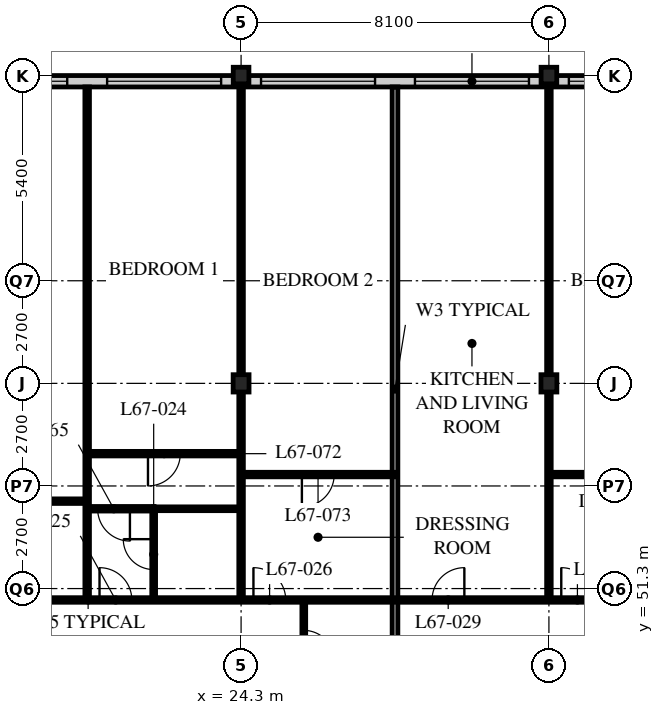
"""IFC4 building model, lengths in metres.
Left out: names, types, materials, properties, quantities, classifications, styles, units other than length and angle.
Written with IfcOpenShell. Run it as: python <this file> out.ifc"""

import sys

from ifc_helpers import new_model, si_unit, direction, frame, frame_2d, origin, origin_2d, place, context, subcontext, project, spatial, rectangle, i_section, extrude, element, fill, save


model = new_model("IFC4")
c1 = context("Model", 3, precision=1e-05, world=origin(), true_north=direction((0.0, 1.0)))
c2 = subcontext(c1, "Body", "Model", "MODEL_VIEW")
j1 = project(units=[si_unit("LENGTHUNIT", "METRE"), si_unit("PLANEANGLEUNIT", "RADIAN")], contexts=[c1])
p1 = place(None, origin())
s1 = spatial("IfcSite", under=j1, at=p1, CompositionType="ELEMENT")
p2 = place(p1, origin())
s2 = spatial("IfcBuilding", under=s1, at=p2, CompositionType="ELEMENT")
p3 = place(p2, frame((0.0, 0.0, 261.9)))
s3 = spatial("IfcBuildingStorey", under=s2, at=p3, CompositionType="ELEMENT", Elevation=261.9)
p4 = place(p3, frame((24.3, 56.7, 0.0), z_axis=(0.0, 0.0, 1.0), x_axis=(1.0, 0.0, 0.0)))
e1 = element("IfcColumn", 1, at=p4, inside=s3, PredefinedType="COLUMN", context=c2, shape_type="SweptSolid", body=[
    extrude(i_section(OverallWidth=0.418, OverallDepth=0.456, WebThickness=0.042, FlangeThickness=0.067, FilletRadius=0.015, at=origin_2d()), origin(), (0.0, 0.0, 1.0), 3.9),
])
p5 = place(p3, frame((24.3, 64.8, 0.0), z_axis=(0.0, 0.0, 1.0), x_axis=(1.0, 0.0, 0.0)))
e2 = element("IfcColumn", 2, at=p5, inside=s3, PredefinedType="COLUMN", context=c2, shape_type="SweptSolid", body=[
    extrude(i_section(OverallWidth=0.412, OverallDepth=0.437, WebThickness=0.036, FlangeThickness=0.058, FilletRadius=0.015, at=origin_2d()), origin(), (0.0, 0.0, 1.0), 3.9),
])
p6 = place(p3, frame((32.4, 56.7, 0.0), z_axis=(0.0, 0.0, 1.0), x_axis=(1.0, 0.0, 0.0)))
e3 = element("IfcColumn", 3, at=p6, inside=s3, PredefinedType="COLUMN", context=c2, shape_type="SweptSolid", body=[
    extrude(i_section(OverallWidth=0.418, OverallDepth=0.456, WebThickness=0.042, FlangeThickness=0.067, FilletRadius=0.015, at=origin_2d()), origin(), (0.0, 0.0, 1.0), 3.9),
])
p7 = place(p3, frame((32.4, 64.8, 0.0), z_axis=(0.0, 0.0, 1.0), x_axis=(1.0, 0.0, 0.0)))
e4 = element("IfcColumn", 4, at=p7, inside=s3, PredefinedType="COLUMN", context=c2, shape_type="SweptSolid", body=[
    extrude(i_section(OverallWidth=0.412, OverallDepth=0.437, WebThickness=0.036, FlangeThickness=0.058, FilletRadius=0.015, at=origin_2d()), origin(), (0.0, 0.0, 1.0), 3.9),
])
p8 = place(p3, frame((48.3, 64.65, 0.0), z_axis=(0.0, 0.0, 1.0), x_axis=(-1.0, 0.0, 0.0)))
e5 = element("IfcWall", 5, at=p8, inside=s3, PredefinedType="SOLIDWALL", context=c2, shape_type="SweptSolid", body=[
    extrude(rectangle(XDim=40.2, YDim=0.3, at=frame_2d((20.1, 0.0))), origin(), (0.0, 0.0, 1.0), 3.69),
])
p9 = place(p8, frame((0.225, 0.0, 0.6)))
e6 = element("IfcOpeningElement", 6, at=p9, cuts=e5, PredefinedType="OPENING", context=c2, shape_type="SweptSolid", body=[
    extrude(rectangle(XDim=3.0, YDim=2.4, at=frame_2d((1.5, 1.2))), frame((0.0, 0.16, 0.0), z_axis=(0.0, -1.0, 0.0), x_axis=(1.0, 0.0, 0.0)), (0.0, 0.0, 1.0), 0.32),
])
p10 = place(p8, frame((4.275, 0.0, 0.6)))
e7 = element("IfcOpeningElement", 7, at=p10, cuts=e5, PredefinedType="OPENING", context=c2, shape_type="SweptSolid", body=[
    extrude(rectangle(XDim=3.0, YDim=2.4, at=frame_2d((1.5, 1.2))), frame((0.0, 0.16, 0.0), z_axis=(0.0, -1.0, 0.0), x_axis=(1.0, 0.0, 0.0)), (0.0, 0.0, 1.0), 0.32),
])
p11 = place(p8, frame((8.325, 0.0, 0.6)))
e8 = element("IfcOpeningElement", 8, at=p11, cuts=e5, PredefinedType="OPENING", context=c2, shape_type="SweptSolid", body=[
    extrude(rectangle(XDim=3.0, YDim=2.4, at=frame_2d((1.5, 1.2))), frame((0.0, 0.16, 0.0), z_axis=(0.0, -1.0, 0.0), x_axis=(1.0, 0.0, 0.0)), (0.0, 0.0, 1.0), 0.32),
])
p12 = place(p8, frame((12.375, 0.0, 0.6)))
e9 = element("IfcOpeningElement", 9, at=p12, cuts=e5, PredefinedType="OPENING", context=c2, shape_type="SweptSolid", body=[
    extrude(rectangle(XDim=3.0, YDim=2.4, at=frame_2d((1.5, 1.2))), frame((0.0, 0.16, 0.0), z_axis=(0.0, -1.0, 0.0), x_axis=(1.0, 0.0, 0.0)), (0.0, 0.0, 1.0), 0.32),
])
p13 = place(p8, frame((16.425, 0.0, 0.6)))
e10 = element("IfcOpeningElement", 10, at=p13, cuts=e5, PredefinedType="OPENING", context=c2, shape_type="SweptSolid", body=[
    extrude(rectangle(XDim=3.0, YDim=2.4, at=frame_2d((1.5, 1.2))), frame((0.0, 0.16, 0.0), z_axis=(0.0, -1.0, 0.0), x_axis=(1.0, 0.0, 0.0)), (0.0, 0.0, 1.0), 0.32),
])
p14 = place(p8, frame((20.475, 0.0, 0.6)))
e11 = element("IfcOpeningElement", 11, at=p14, cuts=e5, PredefinedType="OPENING", context=c2, shape_type="SweptSolid", body=[
    extrude(rectangle(XDim=3.0, YDim=2.4, at=frame_2d((1.5, 1.2))), frame((0.0, 0.16, 0.0), z_axis=(0.0, -1.0, 0.0), x_axis=(1.0, 0.0, 0.0)), (0.0, 0.0, 1.0), 0.32),
])
p15 = place(p8, frame((24.525, 0.0, 0.6)))
e12 = element("IfcOpeningElement", 12, at=p15, cuts=e5, PredefinedType="OPENING", context=c2, shape_type="SweptSolid", body=[
    extrude(rectangle(XDim=3.0, YDim=2.4, at=frame_2d((1.5, 1.2))), frame((0.0, 0.16, 0.0), z_axis=(0.0, -1.0, 0.0), x_axis=(1.0, 0.0, 0.0)), (0.0, 0.0, 1.0), 0.32),
])
p16 = place(p8, frame((28.575, 0.0, 0.6)))
e13 = element("IfcOpeningElement", 13, at=p16, cuts=e5, PredefinedType="OPENING", context=c2, shape_type="SweptSolid", body=[
    extrude(rectangle(XDim=3.0, YDim=2.4, at=frame_2d((1.5, 1.2))), frame((0.0, 0.16, 0.0), z_axis=(0.0, -1.0, 0.0), x_axis=(1.0, 0.0, 0.0)), (0.0, 0.0, 1.0), 0.32),
])
p17 = place(p8, frame((32.625, 0.0, 0.6)))
e14 = element("IfcOpeningElement", 14, at=p17, cuts=e5, PredefinedType="OPENING", context=c2, shape_type="SweptSolid", body=[
    extrude(rectangle(XDim=3.0, YDim=2.4, at=frame_2d((1.5, 1.2))), frame((0.0, 0.16, 0.0), z_axis=(0.0, -1.0, 0.0), x_axis=(1.0, 0.0, 0.0)), (0.0, 0.0, 1.0), 0.32),
])
p18 = place(p8, frame((36.675, 0.0, 0.6)))
e15 = element("IfcOpeningElement", 15, at=p18, cuts=e5, PredefinedType="OPENING", context=c2, shape_type="SweptSolid", body=[
    extrude(rectangle(XDim=3.0, YDim=2.4, at=frame_2d((1.5, 1.2))), frame((0.0, 0.16, 0.0), z_axis=(0.0, -1.0, 0.0), x_axis=(1.0, 0.0, 0.0)), (0.0, 0.0, 1.0), 0.32),
])
p19 = place(p3, frame((25.95, 48.6, 0.0), z_axis=(0.0, 0.0, 1.0), x_axis=(0.0, 1.0, 0.0)))
e16 = element("IfcWall", 16, at=p19, inside=s3, PredefinedType="PARTITIONING", context=c2, shape_type="SweptSolid", body=[
    extrude(rectangle(XDim=2.4, YDim=0.1, at=frame_2d((1.2, 0.0))), origin(), (0.0, 0.0, 1.0), 3.69),
])
p20 = place(p19, frame((0.8, 0.0, 0.0)))
e17 = element("IfcOpeningElement", 17, at=p20, cuts=e16, PredefinedType="OPENING", context=c2, shape_type="SweptSolid", body=[
    extrude(rectangle(XDim=0.8, YDim=2.1, at=frame_2d((0.4, 1.05))), frame((0.0, 0.06, 0.0), z_axis=(0.0, -1.0, 0.0), x_axis=(1.0, 0.0, 0.0)), (0.0, 0.0, 1.0), 0.12),
])
p21 = place(p3, frame((22.0, 51.0, 0.0), z_axis=(0.0, 0.0, 1.0), x_axis=(0.0, 1.0, 0.0)))
e18 = element("IfcWall", 18, at=p21, inside=s3, PredefinedType="PARTITIONING", context=c2, shape_type="SweptSolid", body=[
    extrude(rectangle(XDim=2.4, YDim=0.1, at=frame_2d((1.2, 0.0))), origin(), (0.0, 0.0, 1.0), 3.69),
])
p22 = place(p21, frame((0.8, 0.0, 0.0)))
e19 = element("IfcOpeningElement", 19, at=p22, cuts=e18, PredefinedType="OPENING", context=c2, shape_type="SweptSolid", body=[
    extrude(rectangle(XDim=0.8, YDim=2.1, at=frame_2d((0.4, 1.05))), frame((0.0, 0.06, 0.0), z_axis=(0.0, -1.0, 0.0), x_axis=(1.0, 0.0, 0.0)), (0.0, 0.0, 1.0), 0.12),
])
p23 = place(p3, frame((22.0, 53.4, 0.0), z_axis=(0.0, 0.0, 1.0), x_axis=(1.0, 0.0, 0.0)))
e20 = element("IfcWall", 20, at=p23, inside=s3, PredefinedType="PARTITIONING", context=c2, shape_type="SweptSolid", body=[
    extrude(rectangle(XDim=2.3, YDim=0.1, at=frame_2d((1.15, 0.0))), origin(), (0.0, 0.0, 1.0), 3.69),
])
p24 = place(p3, frame((20.25, 51.0, 0.0), z_axis=(0.0, 0.0, 1.0), x_axis=(0.0, 1.0, 0.0)))
e21 = element("IfcWall", 21, at=p24, inside=s3, PredefinedType="PARTITIONING", context=c2, shape_type="SweptSolid", body=[
    extrude(rectangle(XDim=13.5, YDim=0.12, at=frame_2d((6.75, 0.0))), origin(), (0.0, 0.0, 1.0), 3.69),
])
p25 = place(p3, frame((24.3, 51.0, 0.0), z_axis=(0.0, 0.0, 1.0), x_axis=(0.0, 1.0, 0.0)))
e22 = element("IfcWall", 22, at=p25, inside=s3, PredefinedType="PARTITIONING", context=c2, shape_type="SweptSolid", body=[
    extrude(rectangle(XDim=13.5, YDim=0.12, at=frame_2d((6.75, 0.0))), origin(), (0.0, 0.0, 1.0), 3.078),
])
p26 = place(p3, frame((28.35, 48.6, 0.0), z_axis=(0.0, 0.0, 1.0), x_axis=(0.0, 1.0, 0.0)))
e23 = element("IfcWall", 23, at=p26, inside=s3, PredefinedType="PARTITIONING", context=c2, shape_type="SweptSolid", body=[
    extrude(rectangle(XDim=15.9, YDim=0.15, at=frame_2d((7.95, 0.0))), origin(), (0.0, 0.0, 1.0), 3.69),
])
p27 = place(p3, frame((32.4, 51.0, 0.0), z_axis=(0.0, 0.0, 1.0), x_axis=(0.0, 1.0, 0.0)))
e24 = element("IfcWall", 24, at=p27, inside=s3, PredefinedType="PARTITIONING", context=c2, shape_type="SweptSolid", body=[
    extrude(rectangle(XDim=13.5, YDim=0.12, at=frame_2d((6.75, 0.0))), origin(), (0.0, 0.0, 1.0), 3.078),
])
p28 = place(p3, frame((4.1, 51.0, 0.0), z_axis=(0.0, 0.0, 1.0), x_axis=(1.0, 0.0, 0.0)))
e25 = element("IfcWall", 25, at=p28, inside=s3, PredefinedType="PARTITIONING", context=c2, shape_type="SweptSolid", body=[
    extrude(rectangle(XDim=32.35, YDim=0.12, at=frame_2d((16.175, 0.0))), origin(), (0.0, 0.0, 1.0), 3.69),
])
p29 = place(p28, frame((9.025, 0.0, 0.0)))
e26 = element("IfcOpeningElement", 26, at=p29, cuts=e25, PredefinedType="OPENING", context=c2, shape_type="SweptSolid", body=[
    extrude(rectangle(XDim=0.85, YDim=2.1, at=frame_2d((0.425, 1.05))), frame((0.0, 0.07, 0.0), z_axis=(0.0, -1.0, 0.0), x_axis=(1.0, 0.0, 0.0)), (0.0, 0.0, 1.0), 0.14),
])
p30 = place(p28, frame((16.475, 0.0, 0.0)))
e27 = element("IfcOpeningElement", 27, at=p30, cuts=e25, PredefinedType="OPENING", context=c2, shape_type="SweptSolid", body=[
    extrude(rectangle(XDim=0.85, YDim=2.1, at=frame_2d((0.425, 1.05))), frame((0.0, 0.07, 0.0), z_axis=(0.0, -1.0, 0.0), x_axis=(1.0, 0.0, 0.0)), (0.0, 0.0, 1.0), 0.14),
])
p31 = place(p28, frame((20.525, 0.0, 0.0)))
e28 = element("IfcOpeningElement", 28, at=p31, cuts=e25, PredefinedType="OPENING", context=c2, shape_type="SweptSolid", body=[
    extrude(rectangle(XDim=0.85, YDim=2.1, at=frame_2d((0.425, 1.05))), frame((0.0, 0.07, 0.0), z_axis=(0.0, -1.0, 0.0), x_axis=(1.0, 0.0, 0.0)), (0.0, 0.0, 1.0), 0.14),
])
p32 = place(p28, frame((25.225, 0.0, 0.0)))
e29 = element("IfcOpeningElement", 29, at=p32, cuts=e25, PredefinedType="OPENING", context=c2, shape_type="SweptSolid", body=[
    extrude(rectangle(XDim=0.85, YDim=2.1, at=frame_2d((0.425, 1.05))), frame((0.0, 0.07, 0.0), z_axis=(0.0, -1.0, 0.0), x_axis=(1.0, 0.0, 0.0)), (0.0, 0.0, 1.0), 0.14),
])
p33 = place(p28, frame((28.625, 0.0, 0.0)))
e30 = element("IfcOpeningElement", 30, at=p33, cuts=e25, PredefinedType="OPENING", context=c2, shape_type="SweptSolid", body=[
    extrude(rectangle(XDim=0.85, YDim=2.1, at=frame_2d((0.425, 1.05))), frame((0.0, 0.07, 0.0), z_axis=(0.0, -1.0, 0.0), x_axis=(1.0, 0.0, 0.0)), (0.0, 0.0, 1.0), 0.14),
])
p34 = place(p28, frame((6.725, 0.0, 0.0)))
e31 = element("IfcOpeningElement", 31, at=p34, cuts=e25, PredefinedType="OPENING", context=c2, shape_type="SweptSolid", body=[
    extrude(rectangle(XDim=0.85, YDim=2.1, at=frame_2d((0.425, 1.05))), frame((0.0, 0.07, 0.0), z_axis=(0.0, -1.0, 0.0), x_axis=(1.0, 0.0, 0.0)), (0.0, 0.0, 1.0), 0.14),
])
p35 = place(p28, frame((2.875, 0.0, 0.0)))
e32 = element("IfcOpeningElement", 32, at=p35, cuts=e25, PredefinedType="OPENING", context=c2, shape_type="SweptSolid", body=[
    extrude(rectangle(XDim=0.85, YDim=2.1, at=frame_2d((0.425, 1.05))), frame((0.0, 0.07, 0.0), z_axis=(0.0, -1.0, 0.0), x_axis=(1.0, 0.0, 0.0)), (0.0, 0.0, 1.0), 0.14),
])
p36 = place(p3, frame((20.25, 53.4, 0.0), z_axis=(0.0, 0.0, 1.0), x_axis=(1.0, 0.0, 0.0)))
e33 = element("IfcWall", 33, at=p36, inside=s3, PredefinedType="PARTITIONING", context=c2, shape_type="SweptSolid", body=[
    extrude(rectangle(XDim=1.76, YDim=0.12, at=frame_2d((0.88, 0.0))), origin(), (0.0, 0.0, 1.0), 3.69),
])
p37 = place(p36, frame((0.275, 0.0, 0.0)))
e34 = element("IfcOpeningElement", 34, at=p37, cuts=e33, PredefinedType="OPENING", context=c2, shape_type="SweptSolid", body=[
    extrude(rectangle(XDim=0.85, YDim=2.1, at=frame_2d((0.425, 1.05))), frame((0.0, 0.07, 0.0), z_axis=(0.0, -1.0, 0.0), x_axis=(1.0, 0.0, 0.0)), (0.0, 0.0, 1.0), 0.14),
])
p38 = place(p3, frame((12.15, 53.6, 0.0), z_axis=(0.0, 0.0, 1.0), x_axis=(1.0, 0.0, 0.0)))
e35 = element("IfcWall", 35, at=p38, inside=s3, PredefinedType="PARTITIONING", context=c2, shape_type="SweptSolid", body=[
    extrude(rectangle(XDim=8.1, YDim=0.12, at=frame_2d((4.05, 0.0))), origin(), (0.0, 0.0, 1.0), 3.69),
])
p39 = place(p38, frame((1.675, 0.0, 0.0)))
e36 = element("IfcOpeningElement", 36, at=p39, cuts=e35, PredefinedType="OPENING", context=c2, shape_type="SweptSolid", body=[
    extrude(rectangle(XDim=0.85, YDim=2.1, at=frame_2d((0.425, 1.05))), frame((0.0, 0.07, 0.0), z_axis=(0.0, -1.0, 0.0), x_axis=(1.0, 0.0, 0.0)), (0.0, 0.0, 1.0), 0.14),
])
p40 = place(p3, frame((20.25, 54.85, 0.0), z_axis=(0.0, 0.0, 1.0), x_axis=(1.0, 0.0, 0.0)))
e37 = element("IfcWall", 37, at=p40, inside=s3, PredefinedType="PARTITIONING", context=c2, shape_type="SweptSolid", body=[
    extrude(rectangle(XDim=4.05, YDim=0.12, at=frame_2d((2.025, 0.0))), origin(), (0.0, 0.0, 1.0), 3.69),
])
p41 = place(p40, frame((1.6, 0.0, 0.0)))
e38 = element("IfcOpeningElement", 38, at=p41, cuts=e37, PredefinedType="OPENING", context=c2, shape_type="SweptSolid", body=[
    extrude(rectangle(XDim=0.85, YDim=2.1, at=frame_2d((0.425, 1.05))), frame((0.0, 0.07, 0.0), z_axis=(0.0, -1.0, 0.0), x_axis=(1.0, 0.0, 0.0)), (0.0, 0.0, 1.0), 0.14),
])
p42 = place(p3, frame((24.3, 54.3, 0.0), z_axis=(0.0, 0.0, 1.0), x_axis=(1.0, 0.0, 0.0)))
e39 = element("IfcWall", 39, at=p42, inside=s3, PredefinedType="PARTITIONING", context=c2, shape_type="SweptSolid", body=[
    extrude(rectangle(XDim=4.05, YDim=0.12, at=frame_2d((2.025, 0.0))), origin(), (0.0, 0.0, 1.0), 3.69),
])
p43 = place(p42, frame((1.6, 0.0, 0.0)))
e40 = element("IfcOpeningElement", 40, at=p43, cuts=e39, PredefinedType="OPENING", context=c2, shape_type="SweptSolid", body=[
    extrude(rectangle(XDim=0.85, YDim=2.1, at=frame_2d((0.425, 1.05))), frame((0.0, 0.07, 0.0), z_axis=(0.0, -1.0, 0.0), x_axis=(1.0, 0.0, 0.0)), (0.0, 0.0, 1.0), 0.14),
])
p44 = place(p3, frame((32.4, 54.3, 0.0), z_axis=(0.0, 0.0, 1.0), x_axis=(1.0, 0.0, 0.0)))
e41 = element("IfcWall", 41, at=p44, inside=s3, PredefinedType="PARTITIONING", context=c2, shape_type="SweptSolid", body=[
    extrude(rectangle(XDim=4.05, YDim=0.12, at=frame_2d((2.025, 0.0))), origin(), (0.0, 0.0, 1.0), 3.69),
])
p45 = place(p44, frame((1.6, 0.0, 0.0)))
e42 = element("IfcOpeningElement", 42, at=p45, cuts=e41, PredefinedType="OPENING", context=c2, shape_type="SweptSolid", body=[
    extrude(rectangle(XDim=0.85, YDim=2.1, at=frame_2d((0.425, 1.05))), frame((0.0, 0.07, 0.0), z_axis=(0.0, -1.0, 0.0), x_axis=(1.0, 0.0, 0.0)), (0.0, 0.0, 1.0), 0.14),
])
p46 = place(p12, origin())
e43 = element("IfcWindow", 43, at=p46, inside=s3, PartitioningType="SINGLE_PANEL", PredefinedType="WINDOW", context=c2, shape_type="SweptSolid", body=[
    extrude(rectangle(XDim=3.0, YDim=2.4, at=frame_2d((1.5, 1.2))), frame((0.0, 0.03, 0.0), z_axis=(0.0, -1.0, 0.0), x_axis=(1.0, 0.0, 0.0)), (0.0, 0.0, 1.0), 0.06),
])
fill(e9, e43)
p47 = place(p13, origin())
e44 = element("IfcWindow", 44, at=p47, inside=s3, PartitioningType="SINGLE_PANEL", PredefinedType="WINDOW", context=c2, shape_type="SweptSolid", body=[
    extrude(rectangle(XDim=3.0, YDim=2.4, at=frame_2d((1.5, 1.2))), frame((0.0, 0.03, 0.0), z_axis=(0.0, -1.0, 0.0), x_axis=(1.0, 0.0, 0.0)), (0.0, 0.0, 1.0), 0.06),
])
fill(e10, e44)
p48 = place(p14, origin())
e45 = element("IfcWindow", 45, at=p48, inside=s3, PartitioningType="SINGLE_PANEL", PredefinedType="WINDOW", context=c2, shape_type="SweptSolid", body=[
    extrude(rectangle(XDim=3.0, YDim=2.4, at=frame_2d((1.5, 1.2))), frame((0.0, 0.03, 0.0), z_axis=(0.0, -1.0, 0.0), x_axis=(1.0, 0.0, 0.0)), (0.0, 0.0, 1.0), 0.06),
])
fill(e11, e45)
p49 = place(p15, origin())
e46 = element("IfcWindow", 46, at=p49, inside=s3, PartitioningType="SINGLE_PANEL", PredefinedType="WINDOW", context=c2, shape_type="SweptSolid", body=[
    extrude(rectangle(XDim=3.0, YDim=2.4, at=frame_2d((1.5, 1.2))), frame((0.0, 0.03, 0.0), z_axis=(0.0, -1.0, 0.0), x_axis=(1.0, 0.0, 0.0)), (0.0, 0.0, 1.0), 0.06),
])
fill(e12, e46)
p50 = place(p16, origin())
e47 = element("IfcWindow", 47, at=p50, inside=s3, PartitioningType="SINGLE_PANEL", PredefinedType="WINDOW", context=c2, shape_type="SweptSolid", body=[
    extrude(rectangle(XDim=3.0, YDim=2.4, at=frame_2d((1.5, 1.2))), frame((0.0, 0.03, 0.0), z_axis=(0.0, -1.0, 0.0), x_axis=(1.0, 0.0, 0.0)), (0.0, 0.0, 1.0), 0.06),
])
fill(e13, e47)
p51 = place(p20, origin())
e48 = element("IfcDoor", 48, at=p51, inside=s3, OperationType="SINGLE_SWING_RIGHT", PredefinedType="DOOR", context=c2, shape_type="SweptSolid", body=[
    extrude(rectangle(XDim=0.8, YDim=2.1, at=frame_2d((0.4, 1.05))), frame((0.0, 0.025, 0.0), z_axis=(0.0, -1.0, 0.0), x_axis=(1.0, 0.0, 0.0)), (0.0, 0.0, 1.0), 0.05),
])
fill(e17, e48)
p52 = place(p22, origin())
e49 = element("IfcDoor", 49, at=p52, inside=s3, OperationType="SINGLE_SWING_RIGHT", PredefinedType="DOOR", context=c2, shape_type="SweptSolid", body=[
    extrude(rectangle(XDim=0.8, YDim=2.1, at=frame_2d((0.4, 1.05))), frame((0.0, 0.025, 0.0), z_axis=(0.0, -1.0, 0.0), x_axis=(1.0, 0.0, 0.0)), (0.0, 0.0, 1.0), 0.05),
])
fill(e19, e49)
p53 = place(p30, origin())
e50 = element("IfcDoor", 50, at=p53, inside=s3, OperationType="SINGLE_SWING_LEFT", PredefinedType="DOOR", context=c2, shape_type="SweptSolid", body=[
    extrude(rectangle(XDim=0.85, YDim=2.1, at=frame_2d((0.425, 1.05))), frame((0.0, 0.025, 0.0), z_axis=(0.0, -1.0, 0.0), x_axis=(1.0, 0.0, 0.0)), (0.0, 0.0, 1.0), 0.05),
])
fill(e27, e50)
p54 = place(p31, origin())
e51 = element("IfcDoor", 51, at=p54, inside=s3, OperationType="SINGLE_SWING_LEFT", PredefinedType="DOOR", context=c2, shape_type="SweptSolid", body=[
    extrude(rectangle(XDim=0.85, YDim=2.1, at=frame_2d((0.425, 1.05))), frame((0.0, 0.025, 0.0), z_axis=(0.0, -1.0, 0.0), x_axis=(1.0, 0.0, 0.0)), (0.0, 0.0, 1.0), 0.05),
])
fill(e28, e51)
p55 = place(p32, origin())
e52 = element("IfcDoor", 52, at=p55, inside=s3, OperationType="SINGLE_SWING_RIGHT", PredefinedType="DOOR", context=c2, shape_type="SweptSolid", body=[
    extrude(rectangle(XDim=0.85, YDim=2.1, at=frame_2d((0.425, 1.05))), frame((0.0, 0.025, 0.0), z_axis=(0.0, -1.0, 0.0), x_axis=(1.0, 0.0, 0.0)), (0.0, 0.0, 1.0), 0.05),
])
fill(e29, e52)
p56 = place(p33, origin())
e53 = element("IfcDoor", 53, at=p56, inside=s3, OperationType="SINGLE_SWING_LEFT", PredefinedType="DOOR", context=c2, shape_type="SweptSolid", body=[
    extrude(rectangle(XDim=0.85, YDim=2.1, at=frame_2d((0.425, 1.05))), frame((0.0, 0.025, 0.0), z_axis=(0.0, -1.0, 0.0), x_axis=(1.0, 0.0, 0.0)), (0.0, 0.0, 1.0), 0.05),
])
fill(e30, e53)
p57 = place(p37, origin())
e54 = element("IfcDoor", 54, at=p57, inside=s3, OperationType="SINGLE_SWING_LEFT", PredefinedType="DOOR", context=c2, shape_type="SweptSolid", body=[
    extrude(rectangle(XDim=0.85, YDim=2.1, at=frame_2d((0.425, 1.05))), frame((0.0, 0.025, 0.0), z_axis=(0.0, -1.0, 0.0), x_axis=(1.0, 0.0, 0.0)), (0.0, 0.0, 1.0), 0.05),
])
fill(e34, e54)
p58 = place(p41, origin())
e55 = element("IfcDoor", 55, at=p58, inside=s3, OperationType="SINGLE_SWING_RIGHT", PredefinedType="DOOR", context=c2, shape_type="SweptSolid", body=[
    extrude(rectangle(XDim=0.85, YDim=2.1, at=frame_2d((0.425, 1.05))), frame((0.0, 0.025, 0.0), z_axis=(0.0, -1.0, 0.0), x_axis=(1.0, 0.0, 0.0)), (0.0, 0.0, 1.0), 0.05),
])
fill(e38, e55)
p59 = place(p43, origin())
e56 = element("IfcDoor", 56, at=p59, inside=s3, OperationType="SINGLE_SWING_RIGHT", PredefinedType="DOOR", context=c2, shape_type="SweptSolid", body=[
    extrude(rectangle(XDim=0.85, YDim=2.1, at=frame_2d((0.425, 1.05))), frame((0.0, 0.025, 0.0), z_axis=(0.0, -1.0, 0.0), x_axis=(1.0, 0.0, 0.0)), (0.0, 0.0, 1.0), 0.05),
])
fill(e40, e56)
save(model, sys.argv[1])
